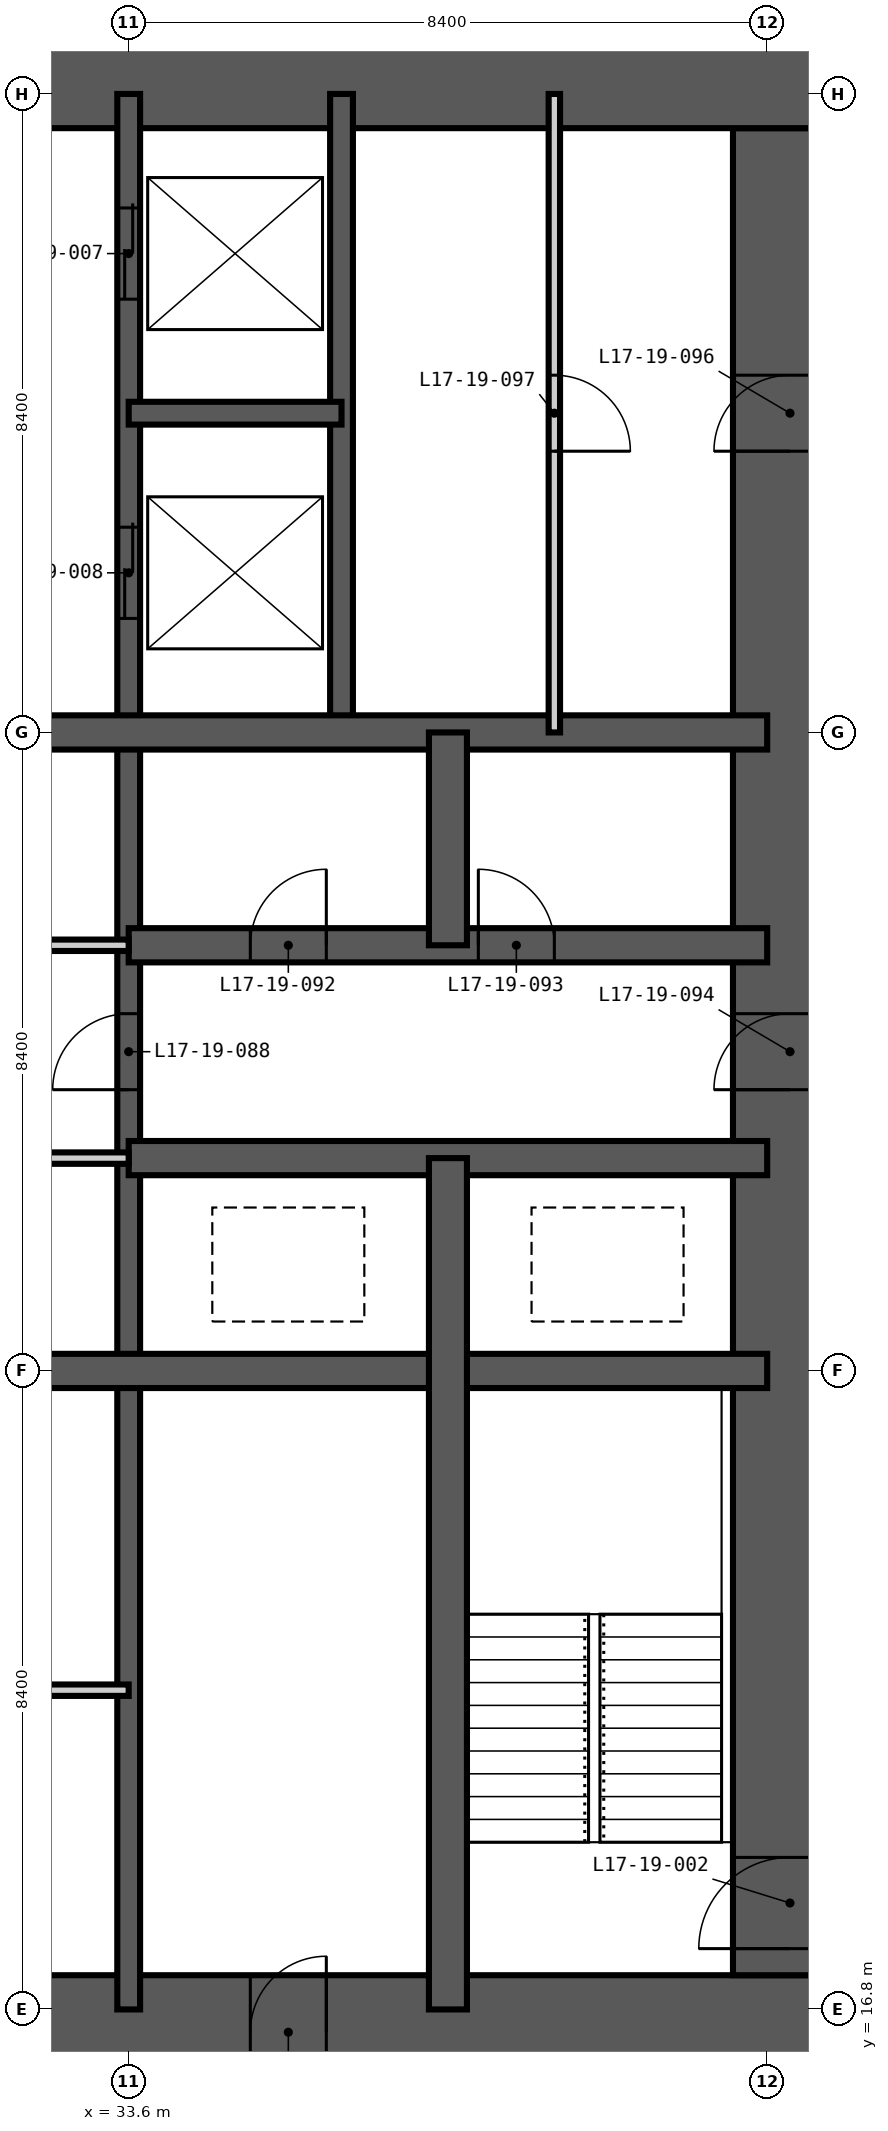
"""IFC4 building model, lengths in metres.
Left out: names, types, materials, properties, quantities, classifications, styles, units other than length and angle.
Written with IfcOpenShell. Run it as: python <this file> out.ifc"""

import sys

from ifc_helpers import new_model, si_unit, direction, frame, frame_2d, origin, place, context, subcontext, project, spatial, rectangle, extrude, element, fill, save


model = new_model("IFC4")
c1 = context("Model", 3, precision=1e-05, world=origin(), true_north=direction((0.0, 1.0)))
c2 = subcontext(c1, "Body", "Model", "MODEL_VIEW")
j1 = project(units=[si_unit("LENGTHUNIT", "METRE"), si_unit("PLANEANGLEUNIT", "RADIAN")], contexts=[c1])
p1 = place(None, origin())
s1 = spatial("IfcSite", under=j1, at=p1, CompositionType="ELEMENT")
p2 = place(p1, origin())
s2 = spatial("IfcBuilding", under=s1, at=p2, CompositionType="ELEMENT")
p3 = place(p2, frame((0.0, 0.0, 70.2)))
s3 = spatial("IfcBuildingStorey", under=s2, at=p3, CompositionType="ELEMENT", Elevation=70.2)
p4 = place(p3, frame((15.75, 16.5, -0.35), z_axis=(0.0, 0.0, 1.0), x_axis=(1.0, 0.0, 0.0)))
e1 = element("IfcWall", 1, at=p4, inside=s3, PredefinedType="SHEAR", context=c2, shape_type="SweptSolid", body=[
    extrude(rectangle(XDim=27.3, YDim=1.5, at=frame_2d((13.65, 0.0))), origin(), (0.0, 0.0, 1.0), 3.6),
])
p5 = place(p4, frame((13.15, 0.0, 0.35)))
e2 = element("IfcOpeningElement", 2, at=p5, cuts=e1, PredefinedType="OPENING", context=c2, shape_type="SweptSolid", body=[
    extrude(rectangle(XDim=1.0, YDim=2.1, at=frame_2d((0.5, 1.05))), frame((0.0, 0.76, 0.0), z_axis=(0.0, -1.0, 0.0), x_axis=(1.0, 0.0, 0.0)), (0.0, 0.0, 1.0), 1.52),
])
p6 = place(p4, frame((19.45, 0.0, 0.35)))
e3 = element("IfcOpeningElement", 3, at=p6, cuts=e1, PredefinedType="OPENING", context=c2, shape_type="SweptSolid", body=[
    extrude(rectangle(XDim=1.0, YDim=2.1, at=frame_2d((0.5, 1.05))), frame((0.0, 0.76, 0.0), z_axis=(0.0, -1.0, 0.0), x_axis=(1.0, 0.0, 0.0)), (0.0, 0.0, 1.0), 1.52),
])
p7 = place(p3, frame((42.3, 17.25, -0.35), z_axis=(0.0, 0.0, 1.0), x_axis=(0.0, 1.0, 0.0)))
e4 = element("IfcWall", 4, at=p7, inside=s3, PredefinedType="SHEAR", context=c2, shape_type="SweptSolid", body=[
    extrude(rectangle(XDim=24.3, YDim=1.5, at=frame_2d((12.15, 0.0))), origin(), (0.0, 0.0, 1.0), 3.6),
])
p8 = place(p7, frame((0.35, 0.0, 0.35)))
e5 = element("IfcOpeningElement", 5, at=p8, cuts=e4, PredefinedType="OPENING", context=c2, shape_type="SweptSolid", body=[
    extrude(rectangle(XDim=1.2, YDim=2.2, at=frame_2d((0.6, 1.1))), frame((0.0, 0.76, 0.0), z_axis=(0.0, -1.0, 0.0), x_axis=(1.0, 0.0, 0.0)), (0.0, 0.0, 1.0), 1.52),
])
p9 = place(p7, frame((11.65, 0.0, 0.35)))
e6 = element("IfcOpeningElement", 6, at=p9, cuts=e4, PredefinedType="OPENING", context=c2, shape_type="SweptSolid", body=[
    extrude(rectangle(XDim=1.0, YDim=2.1, at=frame_2d((0.5, 1.05))), frame((0.0, 0.76, 0.0), z_axis=(0.0, -1.0, 0.0), x_axis=(1.0, 0.0, 0.0)), (0.0, 0.0, 1.0), 1.52),
])
p10 = place(p7, frame((20.05, 0.0, 0.35)))
e7 = element("IfcOpeningElement", 7, at=p10, cuts=e4, PredefinedType="OPENING", context=c2, shape_type="SweptSolid", body=[
    extrude(rectangle(XDim=1.0, YDim=2.1, at=frame_2d((0.5, 1.05))), frame((0.0, 0.76, 0.0), z_axis=(0.0, -1.0, 0.0), x_axis=(1.0, 0.0, 0.0)), (0.0, 0.0, 1.0), 1.52),
])
p11 = place(p3, frame((43.05, 42.3, -0.35), z_axis=(0.0, 0.0, 1.0), x_axis=(-1.0, 0.0, 0.0)))
e8 = element("IfcWall", 8, at=p11, inside=s3, PredefinedType="SHEAR", context=c2, shape_type="SweptSolid", body=[
    extrude(rectangle(XDim=27.3, YDim=1.5, at=frame_2d((13.65, 0.0))), origin(), (0.0, 0.0, 1.0), 3.6),
])
p12 = place(p11, frame((21.55, 0.0, 0.35)))
e9 = element("IfcOpeningElement", 9, at=p12, cuts=e8, PredefinedType="OPENING", context=c2, shape_type="SweptSolid", body=[
    extrude(rectangle(XDim=1.0, YDim=2.1, at=frame_2d((0.5, 1.05))), frame((0.0, 0.76, 0.0), z_axis=(0.0, -1.0, 0.0), x_axis=(1.0, 0.0, 0.0)), (0.0, 0.0, 1.0), 1.52),
])
p13 = place(p11, frame((10.95, 0.0, 0.35)))
e10 = element("IfcOpeningElement", 10, at=p13, cuts=e8, PredefinedType="OPENING", context=c2, shape_type="SweptSolid", body=[
    extrude(rectangle(XDim=1.2, YDim=2.2, at=frame_2d((0.6, 1.1))), frame((0.0, 0.76, 0.0), z_axis=(0.0, -1.0, 0.0), x_axis=(1.0, 0.0, 0.0)), (0.0, 0.0, 1.0), 1.52),
])
p14 = place(p3, frame((33.6, 16.8, -0.35), z_axis=(0.0, 0.0, 1.0), x_axis=(0.0, 1.0, 0.0)))
e11 = element("IfcWall", 11, at=p14, inside=s3, PredefinedType="SHEAR", context=c2, shape_type="SweptSolid", body=[
    extrude(rectangle(XDim=25.2, YDim=0.3, at=frame_2d((12.6, 0.0))), origin(), (0.0, 0.0, 1.0), 3.6),
])
p15 = place(p14, frame((22.5, 0.0, 0.35)))
e12 = element("IfcOpeningElement", 12, at=p15, cuts=e11, PredefinedType="OPENING", context=c2, shape_type="SweptSolid", body=[
    extrude(rectangle(XDim=1.2, YDim=2.2, at=frame_2d((0.6, 1.1))), frame((0.0, 0.16, 0.0), z_axis=(0.0, -1.0, 0.0), x_axis=(1.0, 0.0, 0.0)), (0.0, 0.0, 1.0), 0.32),
])
p16 = place(p14, frame((18.3, 0.0, 0.35)))
e13 = element("IfcOpeningElement", 13, at=p16, cuts=e11, PredefinedType="OPENING", context=c2, shape_type="SweptSolid", body=[
    extrude(rectangle(XDim=1.2, YDim=2.2, at=frame_2d((0.6, 1.1))), frame((0.0, 0.16, 0.0), z_axis=(0.0, -1.0, 0.0), x_axis=(1.0, 0.0, 0.0)), (0.0, 0.0, 1.0), 0.32),
])
p17 = place(p14, frame((12.1, 0.0, 0.35)))
e14 = element("IfcOpeningElement", 14, at=p17, cuts=e11, PredefinedType="OPENING", context=c2, shape_type="SweptSolid", body=[
    extrude(rectangle(XDim=1.0, YDim=2.1, at=frame_2d((0.5, 1.05))), frame((0.0, 0.16, 0.0), z_axis=(0.0, -1.0, 0.0), x_axis=(1.0, 0.0, 0.0)), (0.0, 0.0, 1.0), 0.32),
])
p18 = place(p3, frame((36.4, 33.6, -0.35), z_axis=(0.0, 0.0, 1.0), x_axis=(0.0, 1.0, 0.0)))
e15 = element("IfcWall", 15, at=p18, inside=s3, PredefinedType="SHEAR", context=c2, shape_type="SweptSolid", body=[
    extrude(rectangle(XDim=8.4, YDim=0.3, at=frame_2d((4.2, 0.0))), origin(), (0.0, 0.0, 1.0), 3.6),
])
p19 = place(p3, frame((33.6, 37.8, -0.35), z_axis=(0.0, 0.0, 1.0), x_axis=(1.0, 0.0, 0.0)))
e16 = element("IfcWall", 16, at=p19, inside=s3, PredefinedType="SHEAR", context=c2, shape_type="SweptSolid", body=[
    extrude(rectangle(XDim=2.8, YDim=0.3, at=frame_2d((1.4, 0.0))), origin(), (0.0, 0.0, 1.0), 3.6),
])
p20 = place(p3, frame((16.8, 25.2, -0.35), z_axis=(0.0, 0.0, 1.0), x_axis=(1.0, 0.0, 0.0)))
e17 = element("IfcWall", 17, at=p20, inside=s3, PredefinedType="SHEAR", context=c2, shape_type="SweptSolid", body=[
    extrude(rectangle(XDim=25.2, YDim=0.45, at=frame_2d((12.6, 0.0))), origin(), (0.0, 0.0, 1.0), 3.6),
])
p21 = place(p3, frame((33.6, 28.0, -0.35), z_axis=(0.0, 0.0, 1.0), x_axis=(1.0, 0.0, 0.0)))
e18 = element("IfcWall", 18, at=p21, inside=s3, PredefinedType="SHEAR", context=c2, shape_type="SweptSolid", body=[
    extrude(rectangle(XDim=8.4, YDim=0.45, at=frame_2d((4.2, 0.0))), origin(), (0.0, 0.0, 1.0), 3.6),
])
p22 = place(p3, frame((33.6, 30.8, -0.35), z_axis=(0.0, 0.0, 1.0), x_axis=(1.0, 0.0, 0.0)))
e19 = element("IfcWall", 19, at=p22, inside=s3, PredefinedType="SHEAR", context=c2, shape_type="SweptSolid", body=[
    extrude(rectangle(XDim=8.4, YDim=0.45, at=frame_2d((4.2, 0.0))), origin(), (0.0, 0.0, 1.0), 3.6),
])
p23 = place(p22, frame((1.6, 0.0, 0.35)))
e20 = element("IfcOpeningElement", 20, at=p23, cuts=e19, PredefinedType="OPENING", context=c2, shape_type="SweptSolid", body=[
    extrude(rectangle(XDim=1.0, YDim=2.1, at=frame_2d((0.5, 1.05))), frame((0.0, 0.235, 0.0), z_axis=(0.0, -1.0, 0.0), x_axis=(1.0, 0.0, 0.0)), (0.0, 0.0, 1.0), 0.47),
])
p24 = place(p22, frame((4.6, 0.0, 0.35)))
e21 = element("IfcOpeningElement", 21, at=p24, cuts=e19, PredefinedType="OPENING", context=c2, shape_type="SweptSolid", body=[
    extrude(rectangle(XDim=1.0, YDim=2.1, at=frame_2d((0.5, 1.05))), frame((0.0, 0.235, 0.0), z_axis=(0.0, -1.0, 0.0), x_axis=(1.0, 0.0, 0.0)), (0.0, 0.0, 1.0), 0.47),
])
p25 = place(p3, frame((16.8, 33.6, -0.35), z_axis=(0.0, 0.0, 1.0), x_axis=(1.0, 0.0, 0.0)))
e22 = element("IfcWall", 22, at=p25, inside=s3, PredefinedType="SHEAR", context=c2, shape_type="SweptSolid", body=[
    extrude(rectangle(XDim=25.2, YDim=0.45, at=frame_2d((12.6, 0.0))), origin(), (0.0, 0.0, 1.0), 3.6),
])
p26 = place(p3, frame((37.8, 16.8, -0.35), z_axis=(0.0, 0.0, 1.0), x_axis=(0.0, 1.0, 0.0)))
e23 = element("IfcWall", 23, at=p26, inside=s3, PredefinedType="SHEAR", context=c2, shape_type="SweptSolid", body=[
    extrude(rectangle(XDim=11.2, YDim=0.5, at=frame_2d((5.6, 0.0))), origin(), (0.0, 0.0, 1.0), 3.6),
])
p27 = place(p3, frame((37.8, 30.8, -0.35), z_axis=(0.0, 0.0, 1.0), x_axis=(0.0, 1.0, 0.0)))
e24 = element("IfcWall", 24, at=p27, inside=s3, PredefinedType="SHEAR", context=c2, shape_type="SweptSolid", body=[
    extrude(rectangle(XDim=2.8, YDim=0.5, at=frame_2d((1.4, 0.0))), origin(), (0.0, 0.0, 1.0), 3.6),
])
p28 = place(p3, frame((39.2, 33.6, 0.0), z_axis=(0.0, 0.0, 1.0), x_axis=(0.0, 1.0, 0.0)))
e25 = element("IfcWall", 25, at=p28, inside=s3, PredefinedType="PARTITIONING", context=c2, shape_type="SweptSolid", body=[
    extrude(rectangle(XDim=8.4, YDim=0.15, at=frame_2d((4.2, 0.0))), origin(), (0.0, 0.0, 1.0), 3.25),
])
p29 = place(p28, frame((3.7, 0.0, 0.0)))
e26 = element("IfcOpeningElement", 26, at=p29, cuts=e25, PredefinedType="OPENING", context=c2, shape_type="SweptSolid", body=[
    extrude(rectangle(XDim=1.0, YDim=2.1, at=frame_2d((0.5, 1.05))), frame((0.0, 0.085, 0.0), z_axis=(0.0, -1.0, 0.0), x_axis=(1.0, 0.0, 0.0)), (0.0, 0.0, 1.0), 0.17),
])
p30 = place(p3, frame((25.2, 21.0, 0.0), z_axis=(0.0, 0.0, 1.0), x_axis=(1.0, 0.0, 0.0)))
e27 = element("IfcWall", 27, at=p30, inside=s3, PredefinedType="PARTITIONING", context=c2, shape_type="SweptSolid", body=[
    extrude(rectangle(XDim=8.4, YDim=0.15, at=frame_2d((4.2, 0.0))), origin(), (0.0, 0.0, 1.0), 3.25),
])
p31 = place(p30, frame((3.7, 0.0, 0.0)))
e28 = element("IfcOpeningElement", 28, at=p31, cuts=e27, PredefinedType="OPENING", context=c2, shape_type="SweptSolid", body=[
    extrude(rectangle(XDim=1.0, YDim=2.1, at=frame_2d((0.5, 1.05))), frame((0.0, 0.085, 0.0), z_axis=(0.0, -1.0, 0.0), x_axis=(1.0, 0.0, 0.0)), (0.0, 0.0, 1.0), 0.17),
])
p32 = place(p3, frame((25.2, 28.0, 0.0), z_axis=(0.0, 0.0, 1.0), x_axis=(1.0, 0.0, 0.0)))
e29 = element("IfcWall", 29, at=p32, inside=s3, PredefinedType="PARTITIONING", context=c2, shape_type="SweptSolid", body=[
    extrude(rectangle(XDim=8.4, YDim=0.15, at=frame_2d((4.2, 0.0))), origin(), (0.0, 0.0, 1.0), 3.25),
])
p33 = place(p32, frame((5.8, 0.0, 0.0)))
e30 = element("IfcOpeningElement", 30, at=p33, cuts=e29, PredefinedType="OPENING", context=c2, shape_type="SweptSolid", body=[
    extrude(rectangle(XDim=1.0, YDim=2.1, at=frame_2d((0.5, 1.05))), frame((0.0, 0.085, 0.0), z_axis=(0.0, -1.0, 0.0), x_axis=(1.0, 0.0, 0.0)), (0.0, 0.0, 1.0), 0.17),
])
p34 = place(p32, frame((1.6, 0.0, 0.0)))
e31 = element("IfcOpeningElement", 31, at=p34, cuts=e29, PredefinedType="OPENING", context=c2, shape_type="SweptSolid", body=[
    extrude(rectangle(XDim=1.0, YDim=2.1, at=frame_2d((0.5, 1.05))), frame((0.0, 0.085, 0.0), z_axis=(0.0, -1.0, 0.0), x_axis=(1.0, 0.0, 0.0)), (0.0, 0.0, 1.0), 0.17),
])
p35 = place(p3, frame((25.2, 30.8, 0.0), z_axis=(0.0, 0.0, 1.0), x_axis=(1.0, 0.0, 0.0)))
e32 = element("IfcWall", 32, at=p35, inside=s3, PredefinedType="PARTITIONING", context=c2, shape_type="SweptSolid", body=[
    extrude(rectangle(XDim=8.4, YDim=0.15, at=frame_2d((4.2, 0.0))), origin(), (0.0, 0.0, 1.0), 3.25),
])
p36 = place(p35, frame((3.7, 0.0, 0.0)))
e33 = element("IfcOpeningElement", 33, at=p36, cuts=e32, PredefinedType="OPENING", context=c2, shape_type="SweptSolid", body=[
    extrude(rectangle(XDim=1.0, YDim=2.1, at=frame_2d((0.5, 1.05))), frame((0.0, 0.085, 0.0), z_axis=(0.0, -1.0, 0.0), x_axis=(1.0, 0.0, 0.0)), (0.0, 0.0, 1.0), 0.17),
])
p37 = place(p8, origin())
e34 = element("IfcDoor", 34, at=p37, inside=s3, OperationType="SINGLE_SWING_LEFT", PredefinedType="DOOR", context=c2, shape_type="SweptSolid", body=[
    extrude(rectangle(XDim=1.2, YDim=2.2, at=frame_2d((0.6, 1.1))), frame((0.0, 0.025, 0.0), z_axis=(0.0, -1.0, 0.0), x_axis=(1.0, 0.0, 0.0)), (0.0, 0.0, 1.0), 0.05),
])
fill(e5, e34)
p38 = place(p15, origin())
e35 = element("IfcDoor", 35, at=p38, inside=s3, OperationType="DOUBLE_DOOR_SLIDING", PredefinedType="DOOR", context=c2, shape_type="SweptSolid", body=[
    extrude(rectangle(XDim=1.2, YDim=2.2, at=frame_2d((0.6, 1.1))), frame((0.0, 0.025, 0.0), z_axis=(0.0, -1.0, 0.0), x_axis=(1.0, 0.0, 0.0)), (0.0, 0.0, 1.0), 0.05),
])
fill(e12, e35)
p39 = place(p16, origin())
e36 = element("IfcDoor", 36, at=p39, inside=s3, OperationType="DOUBLE_DOOR_SLIDING", PredefinedType="DOOR", context=c2, shape_type="SweptSolid", body=[
    extrude(rectangle(XDim=1.2, YDim=2.2, at=frame_2d((0.6, 1.1))), frame((0.0, 0.025, 0.0), z_axis=(0.0, -1.0, 0.0), x_axis=(1.0, 0.0, 0.0)), (0.0, 0.0, 1.0), 0.05),
])
fill(e13, e36)
p40 = place(p17, origin())
e37 = element("IfcDoor", 37, at=p40, inside=s3, OperationType="SINGLE_SWING_LEFT", PredefinedType="DOOR", context=c2, shape_type="SweptSolid", body=[
    extrude(rectangle(XDim=1.0, YDim=2.1, at=frame_2d((0.5, 1.05))), frame((0.0, 0.025, 0.0), z_axis=(0.0, -1.0, 0.0), x_axis=(1.0, 0.0, 0.0)), (0.0, 0.0, 1.0), 0.05),
])
fill(e14, e37)
p41 = place(p23, origin())
e38 = element("IfcDoor", 38, at=p41, inside=s3, OperationType="SINGLE_SWING_RIGHT", PredefinedType="DOOR", context=c2, shape_type="SweptSolid", body=[
    extrude(rectangle(XDim=1.0, YDim=2.1, at=frame_2d((0.5, 1.05))), frame((0.0, 0.025, 0.0), z_axis=(0.0, -1.0, 0.0), x_axis=(1.0, 0.0, 0.0)), (0.0, 0.0, 1.0), 0.05),
])
fill(e20, e38)
p42 = place(p24, origin())
e39 = element("IfcDoor", 39, at=p42, inside=s3, OperationType="SINGLE_SWING_LEFT", PredefinedType="DOOR", context=c2, shape_type="SweptSolid", body=[
    extrude(rectangle(XDim=1.0, YDim=2.1, at=frame_2d((0.5, 1.05))), frame((0.0, 0.025, 0.0), z_axis=(0.0, -1.0, 0.0), x_axis=(1.0, 0.0, 0.0)), (0.0, 0.0, 1.0), 0.05),
])
fill(e21, e39)
p43 = place(p9, origin())
e40 = element("IfcDoor", 40, at=p43, inside=s3, OperationType="SINGLE_SWING_LEFT", PredefinedType="DOOR", context=c2, shape_type="SweptSolid", body=[
    extrude(rectangle(XDim=1.0, YDim=2.1, at=frame_2d((0.5, 1.05))), frame((0.0, 0.025, 0.0), z_axis=(0.0, -1.0, 0.0), x_axis=(1.0, 0.0, 0.0)), (0.0, 0.0, 1.0), 0.05),
])
fill(e6, e40)
p44 = place(p10, origin())
e41 = element("IfcDoor", 41, at=p44, inside=s3, OperationType="SINGLE_SWING_LEFT", PredefinedType="DOOR", context=c2, shape_type="SweptSolid", body=[
    extrude(rectangle(XDim=1.0, YDim=2.1, at=frame_2d((0.5, 1.05))), frame((0.0, 0.025, 0.0), z_axis=(0.0, -1.0, 0.0), x_axis=(1.0, 0.0, 0.0)), (0.0, 0.0, 1.0), 0.05),
])
fill(e7, e41)
p45 = place(p29, frame((1.0, 0.0, 0.0), z_axis=(0.0, 0.0, 1.0), x_axis=(-1.0, 0.0, 0.0)))
e42 = element("IfcDoor", 42, at=p45, inside=s3, OperationType="SINGLE_SWING_RIGHT", PredefinedType="DOOR", context=c2, shape_type="SweptSolid", body=[
    extrude(rectangle(XDim=1.0, YDim=2.1, at=frame_2d((0.5, 1.05))), frame((0.0, 0.025, 0.0), z_axis=(0.0, -1.0, 0.0), x_axis=(1.0, 0.0, 0.0)), (0.0, 0.0, 1.0), 0.05),
])
fill(e26, e42)
p46 = place(p6, origin())
e43 = element("IfcDoor", 43, at=p46, inside=s3, OperationType="SINGLE_SWING_RIGHT", PredefinedType="DOOR", context=c2, shape_type="SweptSolid", body=[
    extrude(rectangle(XDim=1.0, YDim=2.1, at=frame_2d((0.5, 1.05))), frame((0.0, 0.025, 0.0), z_axis=(0.0, -1.0, 0.0), x_axis=(1.0, 0.0, 0.0)), (0.0, 0.0, 1.0), 0.05),
])
fill(e3, e43)
save(model, sys.argv[1])
